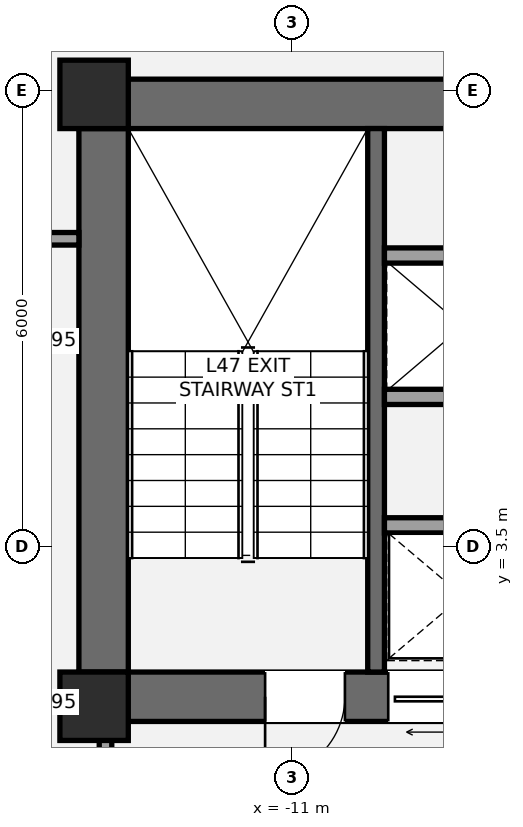
"""IFC4 building model, lengths in metres.
Left out: names, types, materials, properties, quantities, classifications, styles, units other than length and angle.
Written with IfcOpenShell. Run it as: python <this file> out.ifc"""

import sys

from ifc_helpers import new_model, si_unit, direction, frame, frame_2d, origin, origin_2d, place, context, subcontext, project, spatial, rectangle, extrude, element, fill, save


model = new_model("IFC4")
c1 = context("Model", 3, precision=1e-05, world=origin(), true_north=direction((0.0, 1.0)))
c2 = subcontext(c1, "Body", "Model", "MODEL_VIEW")
j1 = project(units=[si_unit("LENGTHUNIT", "METRE"), si_unit("PLANEANGLEUNIT", "RADIAN")], contexts=[c1])
p1 = place(None, origin())
s1 = spatial("IfcSite", under=j1, at=p1, CompositionType="ELEMENT")
p2 = place(p1, origin())
s2 = spatial("IfcBuilding", under=s1, at=p2, CompositionType="ELEMENT")
p3 = place(p2, frame((0.0, 0.0, 172.6)))
s3 = spatial("IfcBuildingStorey", under=s2, at=p3, CompositionType="ELEMENT", Elevation=172.6)
p4 = place(p3, frame((-13.475, 1.2, 0.0), z_axis=(0.0, 0.0, 1.0), x_axis=(0.0, 1.0, 0.0)))
e1 = element("IfcWall", 1, at=p4, inside=s3, PredefinedType="SHEAR", context=c2, shape_type="SweptSolid", body=[
    extrude(rectangle(XDim=8.45, YDim=0.65, at=frame_2d((4.225, 0.0))), origin(), (0.0, 0.0, 1.0), 3.2),
])
p5 = place(p3, frame((-13.8, 9.325, 0.0), z_axis=(0.0, 0.0, 1.0), x_axis=(1.0, 0.0, 0.0)))
e2 = element("IfcWall", 2, at=p5, inside=s3, PredefinedType="SHEAR", context=c2, shape_type="SweptSolid", body=[
    extrude(rectangle(XDim=9.325, YDim=0.65, at=frame_2d((4.663, 0.0))), origin(), (0.0, 0.0, 1.0), 3.2),
])
p6 = place(p3, frame((-4.875, 1.525, 0.0), z_axis=(0.0, 0.0, 1.0), x_axis=(-1.0, 0.0, 0.0)))
e3 = element("IfcWall", 3, at=p6, inside=s3, PredefinedType="SHEAR", context=c2, shape_type="SweptSolid", body=[
    extrude(rectangle(XDim=8.925, YDim=0.65, at=frame_2d((4.462, 0.0))), origin(), (0.0, 0.0, 1.0), 3.2),
])
p7 = place(p6, frame((5.425, 0.0, 0.0)))
e4 = element("IfcOpeningElement", 4, at=p7, cuts=e3, PredefinedType="OPENING", context=c2, shape_type="SweptSolid", body=[
    extrude(rectangle(XDim=1.05, YDim=2.15, at=frame_2d((0.525, 1.075))), frame((0.0, 0.335, 0.0), z_axis=(0.0, -1.0, 0.0), x_axis=(1.0, 0.0, 0.0)), (0.0, 0.0, 1.0), 0.67),
])
p8 = place(p6, frame((3.755, 0.0, 0.0)))
e5 = element("IfcOpeningElement", 5, at=p8, cuts=e3, PredefinedType="OPENING", context=c2, shape_type="SweptSolid", body=[
    extrude(rectangle(XDim=1.1, YDim=2.2, at=frame_2d((0.55, 1.1))), frame((0.0, 0.335, 0.0), z_axis=(0.0, -1.0, 0.0), x_axis=(1.0, 0.0, 0.0)), (0.0, 0.0, 1.0), 0.67),
])
p9 = place(p3, frame((-9.89, 1.85, 0.0), z_axis=(0.0, 0.0, 1.0), x_axis=(0.0, 1.0, 0.0)))
e6 = element("IfcWall", 6, at=p9, inside=s3, PredefinedType="SHEAR", context=c2, shape_type="SweptSolid", body=[
    extrude(rectangle(XDim=7.15, YDim=0.22, at=frame_2d((3.575, 0.0))), origin(), (0.0, 0.0, 1.0), 3.2),
])
for number, where, z_axis, x_axis in (
    (7, (-13.6, 1.4, 0.0), (0.0, 0.0, 1.0), (1.0, 0.0, 0.0)),
    (8, (-13.6, 9.45, 0.0), (0.0, 0.0, 1.0), (1.0, 0.0, 0.0)),
):
    element("IfcColumn", number, at=place(p3, frame(where, z_axis=z_axis, x_axis=x_axis)), inside=s3, PredefinedType="COLUMN", context=c2, shape_type="SweptSolid", body=[
        extrude(rectangle(XDim=0.9, YDim=0.9, at=origin_2d()), origin(), (0.0, 0.0, 1.0), 3.2),
    ])
p10 = place(p3, frame((-13.45, -2.15, 0.0), z_axis=(0.0, 0.0, 1.0), x_axis=(0.0, 1.0, 0.0)))
e9 = element("IfcWall", 9, at=p10, inside=s3, PredefinedType="PARTITIONING", context=c2, shape_type="SweptSolid", body=[
    extrude(rectangle(XDim=3.4, YDim=0.165, at=frame_2d((1.7, 0.0))), origin(), (0.0, 0.0, 1.0), 2.473),
])
p11 = place(p10, frame((1.15, 0.0, 0.0)))
e10 = element("IfcOpeningElement", 10, at=p11, cuts=e9, PredefinedType="OPENING", context=c2, shape_type="SweptSolid", body=[
    extrude(rectangle(XDim=1.05, YDim=2.15, at=frame_2d((0.525, 1.075))), frame((0.0, 0.093, 0.0), z_axis=(0.0, -1.0, 0.0), x_axis=(1.0, 0.0, 0.0)), (0.0, 0.0, 1.0), 0.185),
])
for number, where, z_axis, x_axis in (
    (11, (-9.78, 3.78, 0.0), (0.0, 0.0, 1.0), (1.0, 0.0, 0.0)),
    (12, (-9.78, 5.47, 0.0), (0.0, 0.0, 1.0), (1.0, 0.0, 0.0)),
    (13, (-9.78, 7.33, 0.0), (0.0, 0.0, 1.0), (1.0, 0.0, 0.0)),
):
    element("IfcWall", number, at=place(p3, frame(where, z_axis=z_axis, x_axis=x_axis)), inside=s3, PredefinedType="SOLIDWALL", context=c2, shape_type="SweptSolid", body=[
        extrude(rectangle(XDim=4.255, YDim=0.2, at=frame_2d((2.127, 0.0))), origin(), (0.0, 0.0, 1.0), 3.02),
    ])
p12 = place(p3, frame((-15.55, 7.55, 0.0), z_axis=(0.0, 0.0, 1.0), x_axis=(1.0, 0.0, 0.0)))
e14 = element("IfcWall", 14, at=p12, inside=s3, PredefinedType="PARTITIONING", context=c2, shape_type="SweptSolid", body=[
    extrude(rectangle(XDim=1.75, YDim=0.165, at=frame_2d((0.875, 0.0))), origin(), (0.0, 0.0, 1.0), 3.02),
])
p13 = place(p12, frame((0.3, 0.0, 0.0)))
e15 = element("IfcOpeningElement", 15, at=p13, cuts=e14, PredefinedType="OPENING", context=c2, shape_type="SweptSolid", body=[
    extrude(rectangle(XDim=1.0, YDim=2.15, at=frame_2d((0.5, 1.075))), frame((0.0, 0.093, 0.0), z_axis=(0.0, -1.0, 0.0), x_axis=(1.0, 0.0, 0.0)), (0.0, 0.0, 1.0), 0.185),
])
p14 = place(p7, origin())
e16 = element("IfcDoor", 16, at=p14, inside=s3, OperationType="SINGLE_SWING_RIGHT", PredefinedType="DOOR", context=c2, shape_type="SweptSolid", body=[
    extrude(rectangle(XDim=1.05, YDim=2.15, at=frame_2d((0.525, 1.075))), frame((0.0, 0.025, 0.0), z_axis=(0.0, -1.0, 0.0), x_axis=(1.0, 0.0, 0.0)), (0.0, 0.0, 1.0), 0.05),
])
fill(e4, e16)
p15 = place(p8, origin())
e17 = element("IfcDoor", 17, at=p15, inside=s3, OperationType="SLIDING_TO_LEFT", PredefinedType="DOOR", context=c2, shape_type="SweptSolid", body=[
    extrude(rectangle(XDim=1.1, YDim=2.2, at=frame_2d((0.55, 1.1))), frame((0.0, 0.025, 0.0), z_axis=(0.0, -1.0, 0.0), x_axis=(1.0, 0.0, 0.0)), (0.0, 0.0, 1.0), 0.05),
])
fill(e5, e17)
save(model, sys.argv[1])
